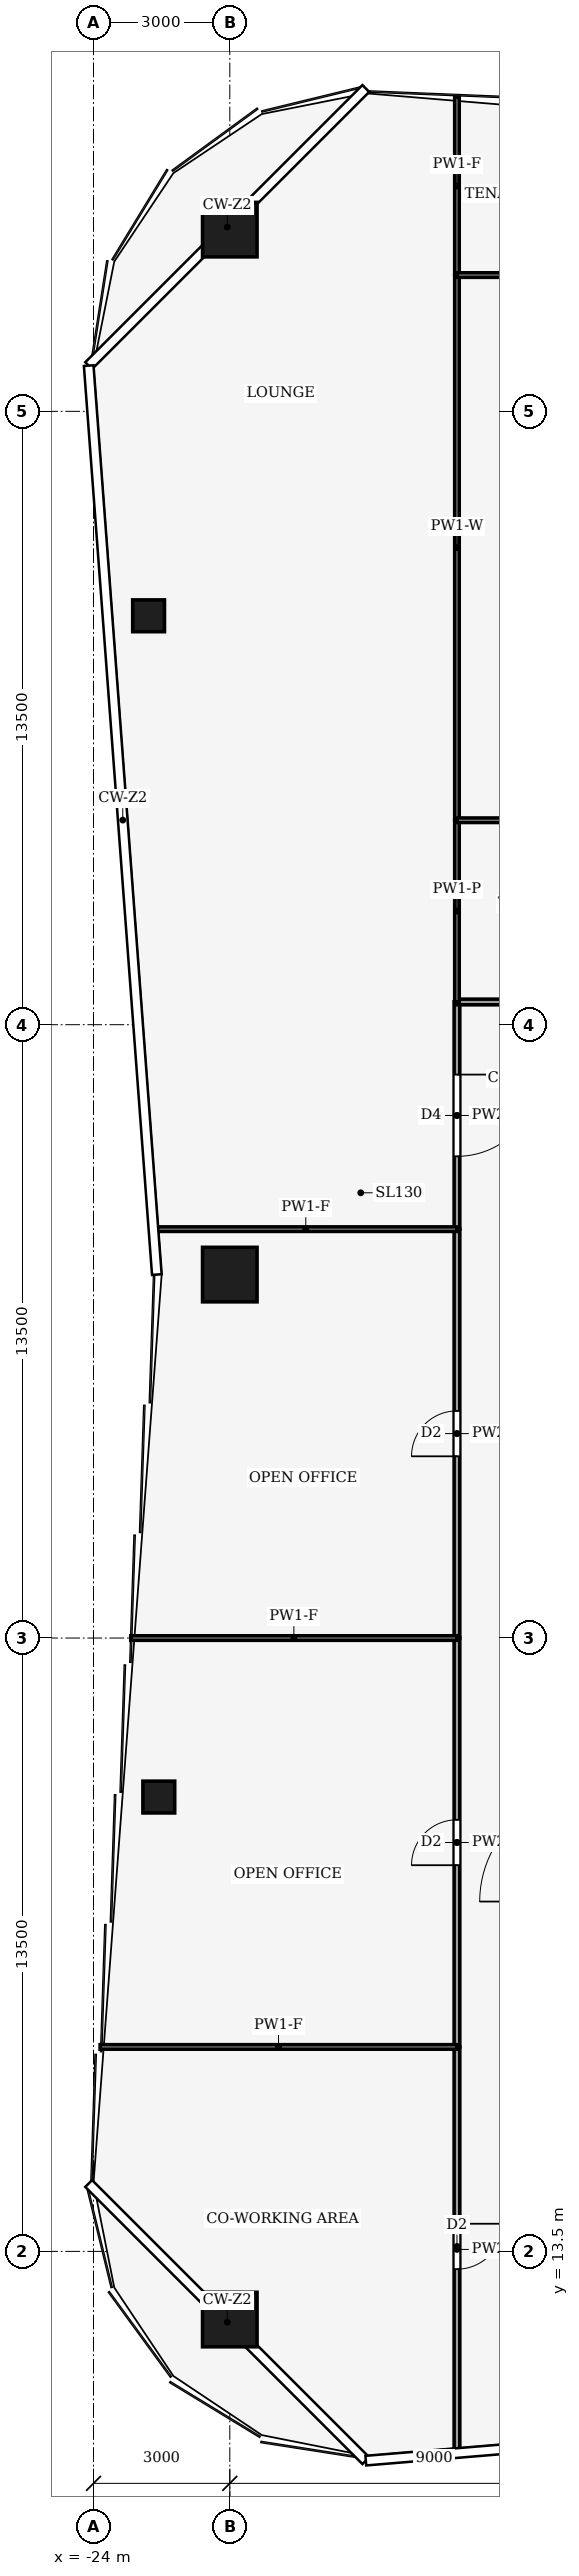
"""IFC4 building model, lengths in metres.
Left out: names, types, materials, properties, quantities, classifications, styles, units other than length and angle.
Written with IfcOpenShell. Run it as: python <this file> out.ifc"""

import sys

from ifc_helpers import new_model, si_unit, direction, frame, frame_2d, origin, origin_2d, place, context, subcontext, project, spatial, rectangle, hollow_rectangle, extrude, element, fill, save


model = new_model("IFC4")
c1 = context("Model", 3, precision=1e-05, world=origin(), true_north=direction((0.0, 1.0)))
c2 = subcontext(c1, "Body", "Model", "MODEL_VIEW")
j1 = project(units=[si_unit("LENGTHUNIT", "METRE"), si_unit("PLANEANGLEUNIT", "RADIAN")], contexts=[c1])
p1 = place(None, origin())
s1 = spatial("IfcSite", under=j1, at=p1, CompositionType="ELEMENT")
p2 = place(p1, origin())
s2 = spatial("IfcBuilding", under=s1, at=p2, CompositionType="ELEMENT")
p3 = place(p2, frame((0.0, 0.0, 158.0)))
s3 = spatial("IfcBuildingStorey", under=s2, at=p3, CompositionType="ELEMENT", Elevation=158.0)
for number, where, z_axis, x_axis in (
    (1, (-21.0, 58.0, 0.0), (0.0, 0.0, 1.0), (1.0, 0.0, 0.0)),
    (2, (-21.0, 12.0, 0.0), (0.0, 0.0, 1.0), (1.0, 0.0, 0.0)),
    (3, (-21.0, 35.0, 0.0), (0.0, 0.0, 1.0), (1.0, 0.0, 0.0)),
):
    element("IfcColumn", number, at=place(p3, frame(where, z_axis=z_axis, x_axis=x_axis)), inside=s3, PredefinedType="COLUMN", context=c2, shape_type="SweptSolid", body=[
        extrude(hollow_rectangle(XDim=1.2, YDim=1.2, WallThickness=0.07, at=origin_2d()), origin(), (0.0, 0.0, 1.0), 4.0),
    ])
for number, where, z_axis, x_axis in (
    (4, (-22.562, 23.5, 0.0), (0.0, 0.0, 1.0), (1.0, 0.0, 0.0)),
    (5, (-22.788, 49.5, 0.0), (0.0, 0.0, 1.0), (1.0, 0.0, 0.0)),
):
    element("IfcColumn", number, at=place(p3, frame(where, z_axis=z_axis, x_axis=x_axis)), inside=s3, PredefinedType="COLUMN", context=c2, shape_type="SweptSolid", body=[
        extrude(hollow_rectangle(XDim=0.7, YDim=0.7, WallThickness=0.03, at=origin_2d()), origin(), (0.0, 0.0, 1.0), 4.0),
    ])
p4 = place(p3, frame((-16.0, 18.0, 0.0), z_axis=(0.0, 0.0, 1.0), x_axis=(0.0, -1.0, 0.0)))
e6 = element("IfcWall", 6, at=p4, inside=s3, PredefinedType="PARTITIONING", context=c2, shape_type="SweptSolid", body=[
    extrude(rectangle(XDim=8.913, YDim=0.125, at=frame_2d((4.457, 0.0))), origin(), (0.0, 0.0, 1.0), 3.04),
])
p5 = place(p4, frame((3.892, 0.0, 0.0)))
e7 = element("IfcOpeningElement", 7, at=p5, cuts=e6, PredefinedType="OPENING", context=c2, shape_type="SweptSolid", body=[
    extrude(rectangle(XDim=1.0, YDim=2.1, at=frame_2d((0.5, 1.05))), frame((0.0, 0.073, 0.0), z_axis=(0.0, -1.0, 0.0), x_axis=(1.0, 0.0, 0.0)), (0.0, 0.0, 1.0), 0.145),
])
p6 = place(p3, frame((-16.0, 18.0, 0.0), z_axis=(0.0, 0.0, 1.0), x_axis=(0.0, 1.0, 0.0)))
e8 = element("IfcWall", 8, at=p6, inside=s3, PredefinedType="PARTITIONING", context=c2, shape_type="SweptSolid", body=[
    extrude(rectangle(XDim=9.0, YDim=0.125, at=frame_2d((4.5, 0.0))), origin(), (0.0, 0.0, 1.0), 3.48),
])
p7 = place(p6, frame((4.0, 0.0, 0.0)))
e9 = element("IfcOpeningElement", 9, at=p7, cuts=e8, PredefinedType="OPENING", context=c2, shape_type="SweptSolid", body=[
    extrude(rectangle(XDim=1.0, YDim=2.1, at=frame_2d((0.5, 1.05))), frame((0.0, 0.073, 0.0), z_axis=(0.0, -1.0, 0.0), x_axis=(1.0, 0.0, 0.0)), (0.0, 0.0, 1.0), 0.145),
])
p8 = place(p3, frame((-16.0, 27.0, 0.0), z_axis=(0.0, 0.0, 1.0), x_axis=(0.0, 1.0, 0.0)))
e10 = element("IfcWall", 10, at=p8, inside=s3, PredefinedType="PARTITIONING", context=c2, shape_type="SweptSolid", body=[
    extrude(rectangle(XDim=9.0, YDim=0.125, at=frame_2d((4.5, 0.0))), origin(), (0.0, 0.0, 1.0), 3.48),
])
p9 = place(p8, frame((4.0, 0.0, 0.0)))
e11 = element("IfcOpeningElement", 11, at=p9, cuts=e10, PredefinedType="OPENING", context=c2, shape_type="SweptSolid", body=[
    extrude(rectangle(XDim=1.0, YDim=2.1, at=frame_2d((0.5, 1.05))), frame((0.0, 0.073, 0.0), z_axis=(0.0, -1.0, 0.0), x_axis=(1.0, 0.0, 0.0)), (0.0, 0.0, 1.0), 0.145),
])
p10 = place(p3, frame((-16.0, 41.004, 0.0), z_axis=(0.0, 0.0, 1.0), x_axis=(0.0, -1.0, 0.0)))
e12 = element("IfcWall", 12, at=p10, inside=s3, PredefinedType="PARTITIONING", context=c2, shape_type="SweptSolid", body=[
    extrude(rectangle(XDim=5.004, YDim=0.125, at=frame_2d((2.502, 0.0))), origin(), (0.0, 0.0, 1.0), 3.14),
])
p11 = place(p10, frame((1.602, 0.0, 0.0)))
e13 = element("IfcOpeningElement", 13, at=p11, cuts=e12, PredefinedType="OPENING", context=c2, shape_type="SweptSolid", body=[
    extrude(rectangle(XDim=1.8, YDim=2.1, at=frame_2d((0.9, 1.05))), frame((0.0, 0.073, 0.0), z_axis=(0.0, -1.0, 0.0), x_axis=(1.0, 0.0, 0.0)), (0.0, 0.0, 1.0), 0.145),
])
p12 = place(p3, frame((-16.0, 41.0, 0.0), z_axis=(0.0, 0.0, 1.0), x_axis=(1.0, 0.0, 0.0)))
e14 = element("IfcWall", 14, at=p12, inside=s3, PredefinedType="PARTITIONING", context=c2, shape_type="SweptSolid", body=[
    extrude(rectangle(XDim=4.0, YDim=0.125, at=frame_2d((2.0, 0.0))), origin(), (0.0, 0.0, 1.0), 3.44),
])
p13 = place(p12, frame((1.5, 0.0, 0.0)))
e15 = element("IfcOpeningElement", 15, at=p13, cuts=e14, PredefinedType="OPENING", context=c2, shape_type="SweptSolid", body=[
    extrude(rectangle(XDim=1.0, YDim=2.1, at=frame_2d((0.5, 1.05))), frame((0.0, 0.073, 0.0), z_axis=(0.0, -1.0, 0.0), x_axis=(1.0, 0.0, 0.0)), (0.0, 0.0, 1.0), 0.145),
])
p14 = place(p3, frame((-16.0, 18.0, 0.0), z_axis=(0.0, 0.0, 1.0), x_axis=(-1.0, 0.0, 0.0)))
e16 = element("IfcWall", 16, at=p14, inside=s3, PredefinedType="PARTITIONING", context=c2, shape_type="SweptSolid", body=[
    extrude(rectangle(XDim=7.855, YDim=0.1, at=frame_2d((3.927, 0.0))), origin(), (0.0, 0.0, 1.0), 3.04),
])
p15 = place(p3, frame((-16.0, 27.0, 0.0), z_axis=(0.0, 0.0, 1.0), x_axis=(-1.0, 0.0, 0.0)))
e17 = element("IfcWall", 17, at=p15, inside=s3, PredefinedType="PARTITIONING", context=c2, shape_type="SweptSolid", body=[
    extrude(rectangle(XDim=7.18, YDim=0.1, at=frame_2d((3.59, 0.0))), origin(), (0.0, 0.0, 1.0), 3.04),
])
p16 = place(p3, frame((-16.0, 36.0, 0.0), z_axis=(0.0, 0.0, 1.0), x_axis=(-1.0, 0.0, 0.0)))
e18 = element("IfcWall", 18, at=p16, inside=s3, PredefinedType="PARTITIONING", context=c2, shape_type="SweptSolid", body=[
    extrude(rectangle(XDim=6.655, YDim=0.1, at=frame_2d((3.328, 0.0))), origin(), (0.0, 0.0, 1.0), 3.04),
])
p17 = place(p3, frame((-16.0, 41.0, 0.0), z_axis=(0.0, 0.0, 1.0), x_axis=(0.0, 1.0, 0.0)))
e19 = element("IfcWall", 19, at=p17, inside=s3, PredefinedType="PARTITIONING", context=c2, shape_type="SweptSolid", body=[
    extrude(rectangle(XDim=4.0, YDim=0.1, at=frame_2d((2.0, 0.0))), origin(), (0.0, 0.0, 1.0), 3.44),
])
p18 = place(p3, frame((-16.0, 45.0, 0.0), z_axis=(0.0, 0.0, 1.0), x_axis=(0.0, 1.0, 0.0)))
e20 = element("IfcWall", 20, at=p18, inside=s3, PredefinedType="PARTITIONING", context=c2, shape_type="SweptSolid", body=[
    extrude(rectangle(XDim=12.0, YDim=0.1, at=frame_2d((6.0, 0.0))), origin(), (0.0, 0.0, 1.0), 3.24),
])
p19 = place(p3, frame((-16.0, 57.0, 0.0), z_axis=(0.0, 0.0, 1.0), x_axis=(0.0, 1.0, 0.0)))
e21 = element("IfcWall", 21, at=p19, inside=s3, PredefinedType="PARTITIONING", context=c2, shape_type="SweptSolid", body=[
    extrude(rectangle(XDim=3.913, YDim=0.1, at=frame_2d((1.957, 0.0))), origin(), (0.0, 0.0, 1.0), 3.04),
])
p20 = place(p3, frame((-11.996, 45.0, 0.0), z_axis=(0.0, 0.0, 1.0), x_axis=(-1.0, 0.0, 0.0)))
e22 = element("IfcWall", 22, at=p20, inside=s3, PredefinedType="PARTITIONING", context=c2, shape_type="SweptSolid", body=[
    extrude(rectangle(XDim=4.004, YDim=0.1, at=frame_2d((2.002, 0.0))), origin(), (0.0, 0.0, 1.0), 3.87),
])
p21 = place(p3, frame((-16.0, 57.0, 0.0), z_axis=(0.0, 0.0, 1.0), x_axis=(1.0, 0.0, 0.0)))
e23 = element("IfcWall", 23, at=p21, inside=s3, PredefinedType="PARTITIONING", context=c2, shape_type="SweptSolid", body=[
    extrude(rectangle(XDim=13.0, YDim=0.1, at=frame_2d((6.5, 0.0))), origin(), (0.0, 0.0, 1.0), 3.44),
])
p22 = place(p21, frame((6.8, 0.0, 0.0)))
e24 = element("IfcOpeningElement", 24, at=p22, cuts=e23, PredefinedType="OPENING", context=c2, shape_type="SweptSolid", body=[
    extrude(rectangle(XDim=1.0, YDim=2.1, at=frame_2d((0.5, 1.05))), frame((0.0, 0.06, 0.0), z_axis=(0.0, -1.0, 0.0), x_axis=(1.0, 0.0, 0.0)), (0.0, 0.0, 1.0), 0.12),
])
p23 = place(p5, origin())
e25 = element("IfcDoor", 25, at=p23, inside=s3, OperationType="SINGLE_SWING_LEFT", PredefinedType="DOOR", context=c2, shape_type="SweptSolid", body=[
    extrude(rectangle(XDim=1.0, YDim=2.1, at=frame_2d((0.5, 1.05))), frame((0.0, 0.025, 0.0), z_axis=(0.0, -1.0, 0.0), x_axis=(1.0, 0.0, 0.0)), (0.0, 0.0, 1.0), 0.05),
])
fill(e7, e25)
p24 = place(p7, origin())
e26 = element("IfcDoor", 26, at=p24, inside=s3, OperationType="SINGLE_SWING_RIGHT", PredefinedType="DOOR", context=c2, shape_type="SweptSolid", body=[
    extrude(rectangle(XDim=1.0, YDim=2.1, at=frame_2d((0.5, 1.05))), frame((0.0, 0.025, 0.0), z_axis=(0.0, -1.0, 0.0), x_axis=(1.0, 0.0, 0.0)), (0.0, 0.0, 1.0), 0.05),
])
fill(e9, e26)
p25 = place(p9, origin())
e27 = element("IfcDoor", 27, at=p25, inside=s3, OperationType="SINGLE_SWING_LEFT", PredefinedType="DOOR", context=c2, shape_type="SweptSolid", body=[
    extrude(rectangle(XDim=1.0, YDim=2.1, at=frame_2d((0.5, 1.05))), frame((0.0, 0.025, 0.0), z_axis=(0.0, -1.0, 0.0), x_axis=(1.0, 0.0, 0.0)), (0.0, 0.0, 1.0), 0.05),
])
fill(e11, e27)
p26 = place(p11, origin())
e28 = element("IfcDoor", 28, at=p26, inside=s3, OperationType="DOUBLE_DOOR_SINGLE_SWING", PredefinedType="DOOR", context=c2, shape_type="SweptSolid", body=[
    extrude(rectangle(XDim=1.8, YDim=2.1, at=frame_2d((0.9, 1.05))), frame((0.0, 0.025, 0.0), z_axis=(0.0, -1.0, 0.0), x_axis=(1.0, 0.0, 0.0)), (0.0, 0.0, 1.0), 0.05),
])
fill(e13, e28)
save(model, sys.argv[1])
